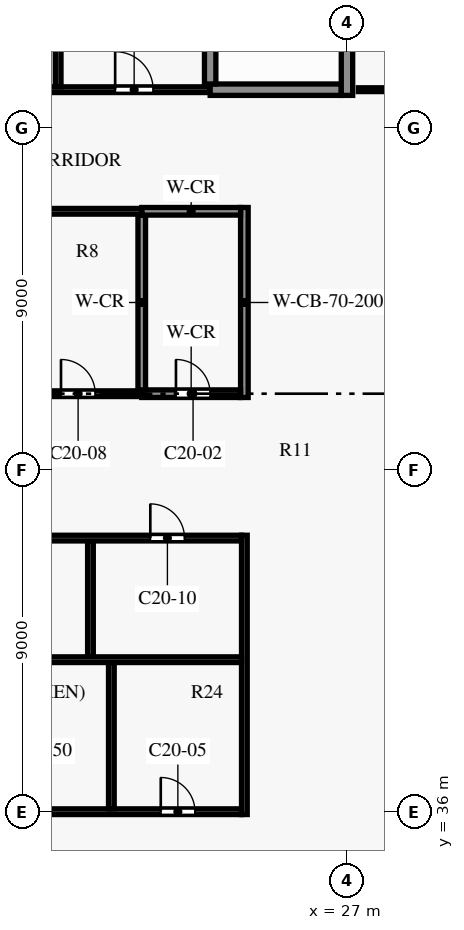
"""IFC4 building model, lengths in metres.
Left out: names, types, materials, properties, quantities, classifications, styles, units other than length and angle.
Written with IfcOpenShell. Run it as: python <this file> out.ifc"""

import sys

from ifc_helpers import new_model, si_unit, direction, frame, frame_2d, origin, place, context, subcontext, project, spatial, rectangle, extrude, element, fill, save


model = new_model("IFC4")
c1 = context("Model", 3, precision=1e-05, world=origin(), true_north=direction((0.0, 1.0)))
c2 = subcontext(c1, "Body", "Model", "MODEL_VIEW")
j1 = project(units=[si_unit("LENGTHUNIT", "METRE"), si_unit("PLANEANGLEUNIT", "RADIAN")], contexts=[c1])
p1 = place(None, origin())
s1 = spatial("IfcSite", under=j1, at=p1, CompositionType="ELEMENT")
p2 = place(p1, origin())
s2 = spatial("IfcBuilding", under=s1, at=p2, CompositionType="ELEMENT")
p3 = place(p2, frame((0.0, 0.0, 143.4)))
s3 = spatial("IfcBuildingStorey", under=s2, at=p3, CompositionType="ELEMENT", Elevation=143.4)
p4 = place(p3, frame((12.4, 36.0, 0.0), z_axis=(0.0, 0.0, 1.0), x_axis=(1.0, 0.0, 0.0)))
e1 = element("IfcWall", 1, at=p4, inside=s3, PredefinedType="SHEAR", context=c2, shape_type="SweptSolid", body=[
    extrude(rectangle(XDim=11.825, YDim=0.15, at=frame_2d((5.913, 0.0))), origin(), (0.0, 0.0, 1.0), 3.5),
])
p5 = place(p4, frame((1.525, 0.0, 0.0)))
e2 = element("IfcOpeningElement", 2, at=p5, cuts=e1, PredefinedType="OPENING", context=c2, shape_type="SweptSolid", body=[
    extrude(rectangle(XDim=0.95, YDim=2.1, at=frame_2d((0.475, 1.05))), frame((0.0, 0.085, 0.0), z_axis=(0.0, -1.0, 0.0), x_axis=(1.0, 0.0, 0.0)), (0.0, 0.0, 1.0), 0.17),
])
p6 = place(p4, frame((5.75, 0.0, 0.0)))
e3 = element("IfcOpeningElement", 3, at=p6, cuts=e1, PredefinedType="OPENING", context=c2, shape_type="SweptSolid", body=[
    extrude(rectangle(XDim=0.9, YDim=2.1, at=frame_2d((0.45, 1.05))), frame((0.0, 0.085, 0.0), z_axis=(0.0, -1.0, 0.0), x_axis=(1.0, 0.0, 0.0)), (0.0, 0.0, 1.0), 0.17),
])
p7 = place(p4, frame((9.7, 0.0, 0.0)))
e4 = element("IfcOpeningElement", 4, at=p7, cuts=e1, PredefinedType="OPENING", context=c2, shape_type="SweptSolid", body=[
    extrude(rectangle(XDim=0.9, YDim=2.1, at=frame_2d((0.45, 1.05))), frame((0.0, 0.085, 0.0), z_axis=(0.0, -1.0, 0.0), x_axis=(1.0, 0.0, 0.0)), (0.0, 0.0, 1.0), 0.17),
])
p8 = place(p3, frame((8.1, 40.0, 0.0), z_axis=(0.0, 0.0, 1.0), x_axis=(1.0, 0.0, 0.0)))
e5 = element("IfcWall", 5, at=p8, inside=s3, PredefinedType="PARTITIONING", context=c2, shape_type="SweptSolid", body=[
    extrude(rectangle(XDim=16.125, YDim=0.15, at=frame_2d((8.062, 0.0))), origin(), (0.0, 0.0, 1.0), 3.5),
])
p9 = place(p3, frame((8.1, 43.2, 0.0), z_axis=(0.0, 0.0, 1.0), x_axis=(1.0, 0.0, 0.0)))
e6 = element("IfcWall", 6, at=p9, inside=s3, PredefinedType="PARTITIONING", context=c2, shape_type="SweptSolid", body=[
    extrude(rectangle(XDim=16.125, YDim=0.15, at=frame_2d((8.062, 0.0))), origin(), (0.0, 0.0, 1.0), 3.5),
])
p10 = place(p9, frame((5.625, 0.0, 0.0)))
e7 = element("IfcOpeningElement", 7, at=p10, cuts=e6, PredefinedType="OPENING", context=c2, shape_type="SweptSolid", body=[
    extrude(rectangle(XDim=0.9, YDim=2.1, at=frame_2d((0.45, 1.05))), frame((0.0, 0.085, 0.0), z_axis=(0.0, -1.0, 0.0), x_axis=(1.0, 0.0, 0.0)), (0.0, 0.0, 1.0), 0.17),
])
p11 = place(p9, frame((13.725, 0.0, 0.0)))
e8 = element("IfcOpeningElement", 8, at=p11, cuts=e6, PredefinedType="OPENING", context=c2, shape_type="SweptSolid", body=[
    extrude(rectangle(XDim=0.9, YDim=2.1, at=frame_2d((0.45, 1.05))), frame((0.0, 0.085, 0.0), z_axis=(0.0, -1.0, 0.0), x_axis=(1.0, 0.0, 0.0)), (0.0, 0.0, 1.0), 0.17),
])
p12 = place(p3, frame((8.1, 47.0, 0.0), z_axis=(0.0, 0.0, 1.0), x_axis=(1.0, 0.0, 0.0)))
e9 = element("IfcWall", 9, at=p12, inside=s3, PredefinedType="PARTITIONING", context=c2, shape_type="SweptSolid", body=[
    extrude(rectangle(XDim=13.5, YDim=0.15, at=frame_2d((6.75, 0.0))), origin(), (0.0, 0.0, 1.0), 3.5),
])
p13 = place(p12, frame((4.625, 0.0, 0.0)))
e10 = element("IfcOpeningElement", 10, at=p13, cuts=e9, PredefinedType="OPENING", context=c2, shape_type="SweptSolid", body=[
    extrude(rectangle(XDim=0.9, YDim=2.1, at=frame_2d((0.45, 1.05))), frame((0.0, 0.085, 0.0), z_axis=(0.0, -1.0, 0.0), x_axis=(1.0, 0.0, 0.0)), (0.0, 0.0, 1.0), 0.17),
])
p14 = place(p12, frame((11.375, 0.0, 0.0)))
e11 = element("IfcOpeningElement", 11, at=p14, cuts=e9, PredefinedType="OPENING", context=c2, shape_type="SweptSolid", body=[
    extrude(rectangle(XDim=0.9, YDim=2.1, at=frame_2d((0.45, 1.05))), frame((0.0, 0.085, 0.0), z_axis=(0.0, -1.0, 0.0), x_axis=(1.0, 0.0, 0.0)), (0.0, 0.0, 1.0), 0.17),
])
p15 = place(p3, frame((21.6, 47.0, 0.0), z_axis=(0.0, 0.0, 1.0), x_axis=(1.0, 0.0, 0.0)))
e12 = element("IfcWall", 12, at=p15, inside=s3, PredefinedType="PARTITIONING", context=c2, shape_type="SweptSolid", body=[
    extrude(rectangle(XDim=2.6, YDim=0.2, at=frame_2d((1.3, 0.0))), origin(), (0.0, 0.0, 1.0), 3.5),
])
p16 = place(p15, frame((0.9, 0.0, 0.0)))
e13 = element("IfcOpeningElement", 13, at=p16, cuts=e12, PredefinedType="OPENING", context=c2, shape_type="SweptSolid", body=[
    extrude(rectangle(XDim=0.9, YDim=2.1, at=frame_2d((0.45, 1.05))), frame((0.0, 0.11, 0.0), z_axis=(0.0, -1.0, 0.0), x_axis=(1.0, 0.0, 0.0)), (0.0, 0.0, 1.0), 0.22),
])
p17 = place(p3, frame((8.225, 51.8, 0.0), z_axis=(0.0, 0.0, 1.0), x_axis=(1.0, 0.0, 0.0)))
e14 = element("IfcWall", 14, at=p17, inside=s3, PredefinedType="PARTITIONING", context=c2, shape_type="SweptSolid", body=[
    extrude(rectangle(XDim=13.375, YDim=0.15, at=frame_2d((6.688, 0.0))), origin(), (0.0, 0.0, 1.0), 3.5),
])
p18 = place(p3, frame((21.6, 51.8, 0.0), z_axis=(0.0, 0.0, 1.0), x_axis=(1.0, 0.0, 0.0)))
e15 = element("IfcWall", 15, at=p18, inside=s3, PredefinedType="PARTITIONING", context=c2, shape_type="SweptSolid", body=[
    extrude(rectangle(XDim=2.6, YDim=0.2, at=frame_2d((1.3, 0.0))), origin(), (0.0, 0.0, 1.0), 3.5),
])
p19 = place(p3, frame((13.5, 55.0, 0.0), z_axis=(0.0, 0.0, 1.0), x_axis=(1.0, 0.0, 0.0)))
e16 = element("IfcWall", 16, at=p19, inside=s3, PredefinedType="PARTITIONING", context=c2, shape_type="SweptSolid", body=[
    extrude(rectangle(XDim=9.9, YDim=0.15, at=frame_2d((4.95, 0.0))), origin(), (0.0, 0.0, 1.0), 3.5),
])
p20 = place(p19, frame((2.45, 0.0, 0.0)))
e17 = element("IfcOpeningElement", 17, at=p20, cuts=e16, PredefinedType="OPENING", context=c2, shape_type="SweptSolid", body=[
    extrude(rectangle(XDim=1.0, YDim=2.1, at=frame_2d((0.5, 1.05))), frame((0.0, 0.085, 0.0), z_axis=(0.0, -1.0, 0.0), x_axis=(1.0, 0.0, 0.0)), (0.0, 0.0, 1.0), 0.17),
])
p21 = place(p19, frame((7.4, 0.0, 0.0)))
e18 = element("IfcOpeningElement", 18, at=p21, cuts=e16, PredefinedType="OPENING", context=c2, shape_type="SweptSolid", body=[
    extrude(rectangle(XDim=1.0, YDim=2.1, at=frame_2d((0.5, 1.05))), frame((0.0, 0.085, 0.0), z_axis=(0.0, -1.0, 0.0), x_axis=(1.0, 0.0, 0.0)), (0.0, 0.0, 1.0), 0.17),
])
p22 = place(p3, frame((23.4, 55.0, 0.0), z_axis=(0.0, 0.0, 1.0), x_axis=(1.0, 0.0, 0.0)))
e19 = element("IfcWall", 19, at=p22, inside=s3, PredefinedType="SHEAR", context=c2, shape_type="SweptSolid", body=[
    extrude(rectangle(XDim=3.45, YDim=0.3, at=frame_2d((1.725, 0.0))), origin(), (0.0, 0.0, 1.0), 3.5),
])
p23 = place(p3, frame((19.4, 55.075, 0.0), z_axis=(0.0, 0.0, 1.0), x_axis=(0.0, 1.0, 0.0)))
e20 = element("IfcWall", 20, at=p23, inside=s3, PredefinedType="PARTITIONING", context=c2, shape_type="SweptSolid", body=[
    extrude(rectangle(XDim=7.075, YDim=0.15, at=frame_2d((3.538, 0.0))), origin(), (0.0, 0.0, 1.0), 3.5),
])
p24 = place(p3, frame((20.25, 40.075, 0.0), z_axis=(0.0, 0.0, 1.0), x_axis=(0.0, 1.0, 0.0)))
e21 = element("IfcWall", 21, at=p24, inside=s3, PredefinedType="PARTITIONING", context=c2, shape_type="SweptSolid", body=[
    extrude(rectangle(XDim=3.05, YDim=0.15, at=frame_2d((1.525, 0.0))), origin(), (0.0, 0.0, 1.0), 3.5),
])
p25 = place(p3, frame((20.8, 36.075, 0.0), z_axis=(0.0, 0.0, 1.0), x_axis=(0.0, 1.0, 0.0)))
e22 = element("IfcWall", 22, at=p25, inside=s3, PredefinedType="PARTITIONING", context=c2, shape_type="SweptSolid", body=[
    extrude(rectangle(XDim=3.85, YDim=0.15, at=frame_2d((1.925, 0.0))), origin(), (0.0, 0.0, 1.0), 3.5),
])
p26 = place(p3, frame((21.6, 47.1, 0.0), z_axis=(0.0, 0.0, 1.0), x_axis=(0.0, 1.0, 0.0)))
e23 = element("IfcWall", 23, at=p26, inside=s3, PredefinedType="PARTITIONING", context=c2, shape_type="SweptSolid", body=[
    extrude(rectangle(XDim=4.6, YDim=0.2, at=frame_2d((2.3, 0.0))), origin(), (0.0, 0.0, 1.0), 3.5),
])
p27 = place(p3, frame((23.4, 55.15, 0.0), z_axis=(0.0, 0.0, 1.0), x_axis=(0.0, 1.0, 0.0)))
e24 = element("IfcWall", 24, at=p27, inside=s3, PredefinedType="SHEAR", context=c2, shape_type="SweptSolid", body=[
    extrude(rectangle(XDim=8.0, YDim=0.3, at=frame_2d((4.0, 0.0))), origin(), (0.0, 0.0, 1.0), 3.5),
])
p28 = place(p3, frame((24.3, 35.925, 0.0), z_axis=(0.0, 0.0, 1.0), x_axis=(0.0, 1.0, 0.0)))
e25 = element("IfcWall", 25, at=p28, inside=s3, PredefinedType="PARTITIONING", context=c2, shape_type="SweptSolid", body=[
    extrude(rectangle(XDim=7.35, YDim=0.15, at=frame_2d((3.675, 0.0))), origin(), (0.0, 0.0, 1.0), 3.5),
])
p29 = place(p3, frame((24.3, 46.9, 0.0), z_axis=(0.0, 0.0, 1.0), x_axis=(0.0, 1.0, 0.0)))
e26 = element("IfcWall", 26, at=p29, inside=s3, PredefinedType="SHEAR", context=c2, shape_type="SweptSolid", body=[
    extrude(rectangle(XDim=5.0, YDim=0.2, at=frame_2d((2.5, 0.0))), origin(), (0.0, 0.0, 1.0), 3.5),
])
p30 = place(p3, frame((27.0, 54.85, 0.0), z_axis=(0.0, 0.0, 1.0), x_axis=(0.0, 1.0, 0.0)))
e27 = element("IfcWall", 27, at=p30, inside=s3, PredefinedType="SHEAR", context=c2, shape_type="SweptSolid", body=[
    extrude(rectangle(XDim=8.5, YDim=0.3, at=frame_2d((4.25, 0.0))), origin(), (0.0, 0.0, 1.0), 3.5),
])
p31 = place(p30, frame((6.55, 0.0, 0.0)))
e28 = element("IfcOpeningElement", 28, at=p31, cuts=e27, PredefinedType="OPENING", context=c2, shape_type="SweptSolid", body=[
    extrude(rectangle(XDim=1.2, YDim=2.2, at=frame_2d((0.6, 1.1))), frame((0.0, 0.16, 0.0), z_axis=(0.0, -1.0, 0.0), x_axis=(1.0, 0.0, 0.0)), (0.0, 0.0, 1.0), 0.32),
])
p32 = place(p3, frame((27.3, 55.0, 0.0), z_axis=(0.0, 0.0, 1.0), x_axis=(1.0, 0.0, 0.0)))
e29 = element("IfcWall", 29, at=p32, inside=s3, PredefinedType="PARTITIONING", context=c2, shape_type="SweptSolid", body=[
    extrude(rectangle(XDim=3.25, YDim=0.1, at=frame_2d((1.625, 0.0))), origin(), (0.0, 0.0, 1.0), 3.48),
])
p33 = place(p16, origin())
e30 = element("IfcDoor", 30, at=p33, inside=s3, OperationType="SINGLE_SWING_LEFT", PredefinedType="DOOR", context=c2, shape_type="SweptSolid", body=[
    extrude(rectangle(XDim=0.9, YDim=2.1, at=frame_2d((0.45, 1.05))), frame((0.0, 0.025, 0.0), z_axis=(0.0, -1.0, 0.0), x_axis=(1.0, 0.0, 0.0)), (0.0, 0.0, 1.0), 0.05),
])
fill(e13, e30)
p34 = place(p7, origin())
e31 = element("IfcDoor", 31, at=p34, inside=s3, OperationType="SINGLE_SWING_RIGHT", PredefinedType="DOOR", context=c2, shape_type="SweptSolid", body=[
    extrude(rectangle(XDim=0.9, YDim=2.1, at=frame_2d((0.45, 1.05))), frame((0.0, 0.025, 0.0), z_axis=(0.0, -1.0, 0.0), x_axis=(1.0, 0.0, 0.0)), (0.0, 0.0, 1.0), 0.05),
])
fill(e4, e31)
p35 = place(p14, origin())
e32 = element("IfcDoor", 32, at=p35, inside=s3, OperationType="SINGLE_SWING_RIGHT", PredefinedType="DOOR", context=c2, shape_type="SweptSolid", body=[
    extrude(rectangle(XDim=0.9, YDim=2.1, at=frame_2d((0.45, 1.05))), frame((0.0, 0.025, 0.0), z_axis=(0.0, -1.0, 0.0), x_axis=(1.0, 0.0, 0.0)), (0.0, 0.0, 1.0), 0.05),
])
fill(e11, e32)
p36 = place(p11, origin())
e33 = element("IfcDoor", 33, at=p36, inside=s3, OperationType="SINGLE_SWING_LEFT", PredefinedType="DOOR", context=c2, shape_type="SweptSolid", body=[
    extrude(rectangle(XDim=0.9, YDim=2.1, at=frame_2d((0.45, 1.05))), frame((0.0, 0.025, 0.0), z_axis=(0.0, -1.0, 0.0), x_axis=(1.0, 0.0, 0.0)), (0.0, 0.0, 1.0), 0.05),
])
fill(e8, e33)
p37 = place(p21, origin())
e34 = element("IfcDoor", 34, at=p37, inside=s3, OperationType="SINGLE_SWING_RIGHT", PredefinedType="DOOR", context=c2, shape_type="SweptSolid", body=[
    extrude(rectangle(XDim=1.0, YDim=2.1, at=frame_2d((0.5, 1.05))), frame((0.0, 0.025, 0.0), z_axis=(0.0, -1.0, 0.0), x_axis=(1.0, 0.0, 0.0)), (0.0, 0.0, 1.0), 0.05),
])
fill(e18, e34)
save(model, sys.argv[1])
